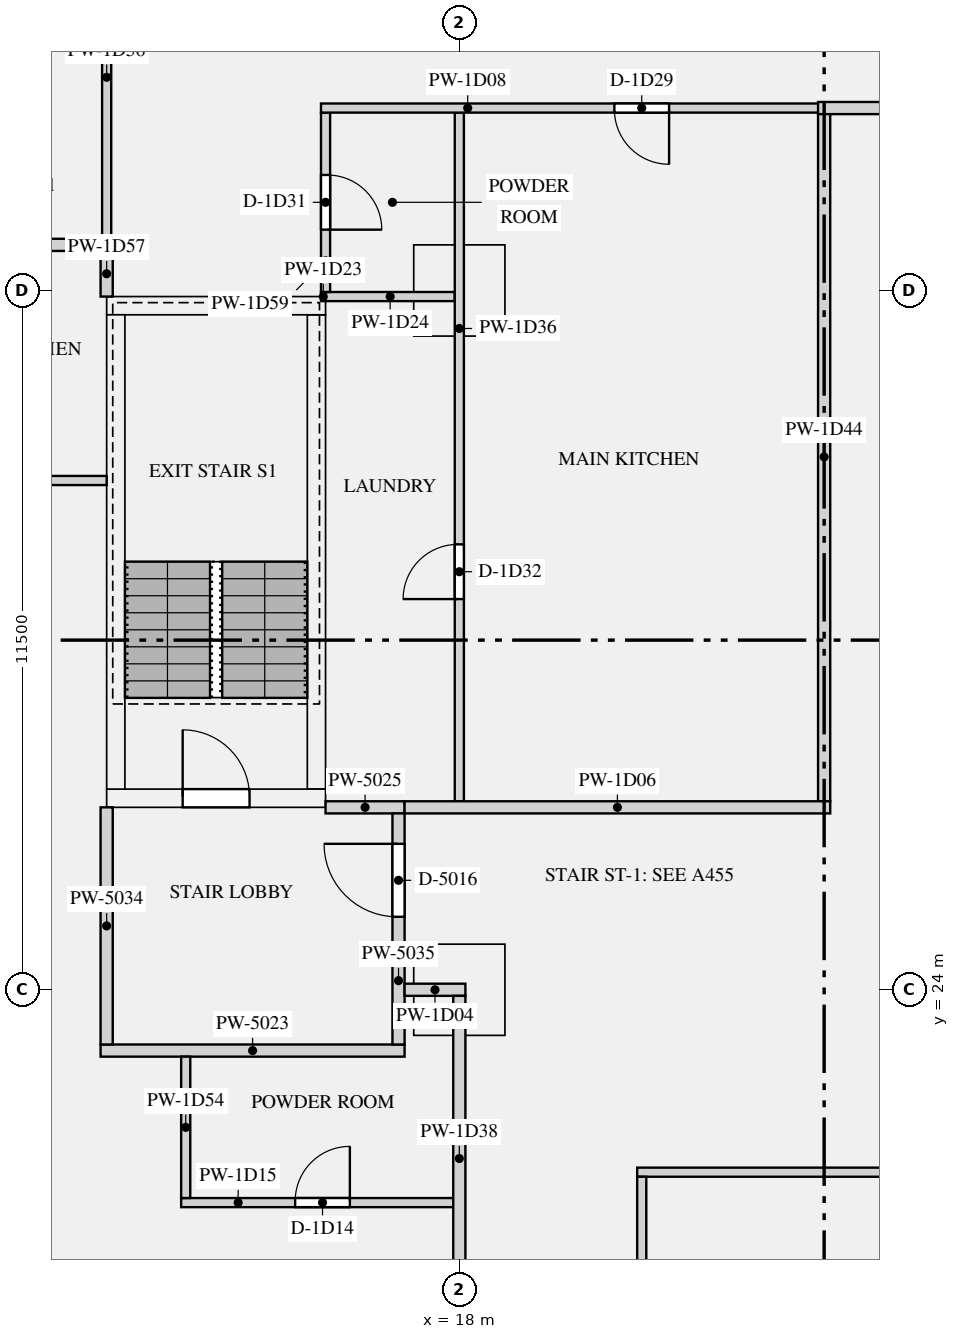
"""IFC4 building model, lengths in metres.
Left out: names, types, materials, properties, quantities, classifications, styles, units other than length and angle.
Written with IfcOpenShell. Run it as: python <this file> out.ifc"""

import sys

from ifc_helpers import new_model, si_unit, direction, frame, frame_2d, origin, origin_2d, place, context, subcontext, project, spatial, rectangle, extrude, element, fill, save


model = new_model("IFC4")
c1 = context("Model", 3, precision=1e-05, world=origin(), true_north=direction((0.0, 1.0)))
c2 = subcontext(c1, "Body", "Model", "MODEL_VIEW")
j1 = project(units=[si_unit("LENGTHUNIT", "METRE"), si_unit("PLANEANGLEUNIT", "RADIAN")], contexts=[c1])
p1 = place(None, origin())
s1 = spatial("IfcSite", under=j1, at=p1, CompositionType="ELEMENT")
p2 = place(p1, origin())
s2 = spatial("IfcBuilding", under=s1, at=p2, CompositionType="ELEMENT")
p3 = place(p2, frame((0.0, 0.0, 47.85)))
s3 = spatial("IfcBuildingStorey", under=s2, at=p3, CompositionType="ELEMENT", Elevation=47.85)
for number, where, z_axis, x_axis in (
    (1, (18.0, 24.0, 0.0), (0.0, 0.0, 1.0), (1.0, 0.0, 0.0)),
    (2, (18.0, 35.5, 0.0), (0.0, 0.0, 1.0), (1.0, 0.0, 0.0)),
):
    element("IfcColumn", number, at=place(p3, frame(where, z_axis=z_axis, x_axis=x_axis)), inside=s3, PredefinedType="COLUMN", context=c2, shape_type="SweptSolid", body=[
        extrude(rectangle(XDim=1.5, YDim=1.5, at=origin_2d()), origin(), (0.0, 0.0, 1.0), 3.15),
    ])
p4 = place(p3, frame((12.2, 27.15, 0.0), z_axis=(0.0, 0.0, 1.0), x_axis=(1.0, 0.0, 0.0)))
e3 = element("IfcWall", 3, at=p4, inside=s3, PredefinedType="SHEAR", context=c2, shape_type="SweptSolid", body=[
    extrude(rectangle(XDim=3.6, YDim=0.3, at=frame_2d((1.8, 0.0))), origin(), (0.0, 0.0, 1.0), 3.15),
])
p5 = place(p4, frame((1.25, 0.0, 0.0)))
e4 = element("IfcOpeningElement", 4, at=p5, cuts=e3, PredefinedType="OPENING", context=c2, shape_type="SweptSolid", body=[
    extrude(rectangle(XDim=1.1, YDim=2.1, at=frame_2d((0.55, 1.05))), frame((0.0, 0.16, 0.0), z_axis=(0.0, -1.0, 0.0), x_axis=(1.0, 0.0, 0.0)), (0.0, 0.0, 1.0), 0.32),
])
p6 = place(p3, frame((12.2, 35.25, 0.0), z_axis=(0.0, 0.0, 1.0), x_axis=(1.0, 0.0, 0.0)))
e5 = element("IfcWall", 5, at=p6, inside=s3, PredefinedType="SHEAR", context=c2, shape_type="SweptSolid", body=[
    extrude(rectangle(XDim=3.6, YDim=0.3, at=frame_2d((1.8, 0.0))), origin(), (0.0, 0.0, 1.0), 3.15),
])
for number, where, z_axis, x_axis in (
    (6, (12.35, 27.3, 0.0), (0.0, 0.0, 1.0), (0.0, 1.0, 0.0)),
    (7, (15.65, 27.3, 0.0), (0.0, 0.0, 1.0), (0.0, 1.0, 0.0)),
):
    element("IfcWall", number, at=place(p3, frame(where, z_axis=z_axis, x_axis=x_axis)), inside=s3, PredefinedType="SHEAR", context=c2, shape_type="SweptSolid", body=[
        extrude(rectangle(XDim=7.8, YDim=0.3, at=frame_2d((3.9, 0.0))), origin(), (0.0, 0.0, 1.0), 3.15),
    ])
p7 = place(p3, frame((12.1, 23.0, 0.0), z_axis=(0.0, 0.0, 1.0), x_axis=(1.0, 0.0, 0.0)))
e8 = element("IfcWall", 8, at=p7, inside=s3, PredefinedType="PARTITIONING", context=c2, shape_type="SweptSolid", body=[
    extrude(rectangle(XDim=5.0, YDim=0.2, at=frame_2d((2.5, 0.0))), origin(), (0.0, 0.0, 1.0), 2.83),
])
p8 = place(p3, frame((15.8, 27.0, 0.0), z_axis=(0.0, 0.0, 1.0), x_axis=(1.0, 0.0, 0.0)))
e9 = element("IfcWall", 9, at=p8, inside=s3, PredefinedType="PARTITIONING", context=c2, shape_type="SweptSolid", body=[
    extrude(rectangle(XDim=1.3, YDim=0.2, at=frame_2d((0.65, 0.0))), origin(), (0.0, 0.0, 1.0), 2.83),
])
p9 = place(p3, frame((12.2, 23.1, 0.0), z_axis=(0.0, 0.0, 1.0), x_axis=(0.0, 1.0, 0.0)))
e10 = element("IfcWall", 10, at=p9, inside=s3, PredefinedType="PARTITIONING", context=c2, shape_type="SweptSolid", body=[
    extrude(rectangle(XDim=3.9, YDim=0.2, at=frame_2d((1.95, 0.0))), origin(), (0.0, 0.0, 1.0), 2.83),
])
p10 = place(p3, frame((17.0, 23.1, 0.0), z_axis=(0.0, 0.0, 1.0), x_axis=(0.0, 1.0, 0.0)))
e11 = element("IfcWall", 11, at=p10, inside=s3, PredefinedType="PARTITIONING", context=c2, shape_type="SweptSolid", body=[
    extrude(rectangle(XDim=3.8, YDim=0.2, at=frame_2d((1.9, 0.0))), origin(), (0.0, 0.0, 1.0), 2.83),
])
p11 = place(p10, frame((2.1, 0.0, 0.0)))
e12 = element("IfcOpeningElement", 12, at=p11, cuts=e11, PredefinedType="OPENING", context=c2, shape_type="SweptSolid", body=[
    extrude(rectangle(XDim=1.2, YDim=2.1, at=frame_2d((0.6, 1.05))), frame((0.0, 0.11, 0.0), z_axis=(0.0, -1.0, 0.0), x_axis=(1.0, 0.0, 0.0)), (0.0, 0.0, 1.0), 0.22),
])
p12 = place(p3, frame((20.925, 21.0, 0.0), z_axis=(0.0, 0.0, 1.0), x_axis=(1.0, 0.0, 0.0)))
e13 = element("IfcWall", 13, at=p12, inside=s3, PredefinedType="PARTITIONING", context=c2, shape_type="SweptSolid", body=[
    extrude(rectangle(XDim=30.15, YDim=0.15, at=frame_2d((15.075, 0.0))), origin(), (0.0, 0.0, 1.0), 2.83),
])
p13 = place(p12, frame((4.125, 0.0, 0.0)))
e14 = element("IfcOpeningElement", 14, at=p13, cuts=e13, PredefinedType="OPENING", context=c2, shape_type="SweptSolid", body=[
    extrude(rectangle(XDim=0.9, YDim=2.1, at=frame_2d((0.45, 1.05))), frame((0.0, 0.085, 0.0), z_axis=(0.0, -1.0, 0.0), x_axis=(1.0, 0.0, 0.0)), (0.0, 0.0, 1.0), 0.17),
])
p14 = place(p12, frame((10.875, 0.0, 0.0)))
e15 = element("IfcOpeningElement", 15, at=p14, cuts=e13, PredefinedType="OPENING", context=c2, shape_type="SweptSolid", body=[
    extrude(rectangle(XDim=0.9, YDim=2.1, at=frame_2d((0.45, 1.05))), frame((0.0, 0.085, 0.0), z_axis=(0.0, -1.0, 0.0), x_axis=(1.0, 0.0, 0.0)), (0.0, 0.0, 1.0), 0.17),
])
p15 = place(p12, frame((16.125, 0.0, 0.0)))
e16 = element("IfcOpeningElement", 16, at=p15, cuts=e13, PredefinedType="OPENING", context=c2, shape_type="SweptSolid", body=[
    extrude(rectangle(XDim=0.9, YDim=2.1, at=frame_2d((0.45, 1.05))), frame((0.0, 0.085, 0.0), z_axis=(0.0, -1.0, 0.0), x_axis=(1.0, 0.0, 0.0)), (0.0, 0.0, 1.0), 0.17),
])
p16 = place(p12, frame((21.375, 0.0, 0.0)))
e17 = element("IfcOpeningElement", 17, at=p16, cuts=e13, PredefinedType="OPENING", context=c2, shape_type="SweptSolid", body=[
    extrude(rectangle(XDim=0.9, YDim=2.1, at=frame_2d((0.45, 1.05))), frame((0.0, 0.085, 0.0), z_axis=(0.0, -1.0, 0.0), x_axis=(1.0, 0.0, 0.0)), (0.0, 0.0, 1.0), 0.17),
])
p17 = place(p12, frame((26.625, 0.0, 0.0)))
e18 = element("IfcOpeningElement", 18, at=p17, cuts=e13, PredefinedType="OPENING", context=c2, shape_type="SweptSolid", body=[
    extrude(rectangle(XDim=0.9, YDim=2.1, at=frame_2d((0.45, 1.05))), frame((0.0, 0.085, 0.0), z_axis=(0.0, -1.0, 0.0), x_axis=(1.0, 0.0, 0.0)), (0.0, 0.0, 1.0), 0.17),
])
p18 = place(p3, frame((17.1, 24.0, 0.0), z_axis=(0.0, 0.0, 1.0), x_axis=(1.0, 0.0, 0.0)))
e19 = element("IfcWall", 19, at=p18, inside=s3, PredefinedType="PARTITIONING", context=c2, shape_type="SweptSolid", body=[
    extrude(rectangle(XDim=1.0, YDim=0.2, at=frame_2d((0.5, 0.0))), origin(), (0.0, 0.0, 1.0), 2.83),
])
p19 = place(p3, frame((17.1, 27.0, 0.0), z_axis=(0.0, 0.0, 1.0), x_axis=(1.0, 0.0, 0.0)))
e20 = element("IfcWall", 20, at=p19, inside=s3, PredefinedType="PARTITIONING", context=c2, shape_type="SweptSolid", body=[
    extrude(rectangle(XDim=7.0, YDim=0.2, at=frame_2d((3.5, 0.0))), origin(), (0.0, 0.0, 1.0), 2.83),
])
p20 = place(p3, frame((15.725, 38.5, 0.0), z_axis=(0.0, 0.0, 1.0), x_axis=(1.0, 0.0, 0.0)))
e21 = element("IfcWall", 21, at=p20, inside=s3, PredefinedType="PARTITIONING", context=c2, shape_type="SweptSolid", body=[
    extrude(rectangle(XDim=8.375, YDim=0.15, at=frame_2d((4.188, 0.0))), origin(), (0.0, 0.0, 1.0), 2.83),
])
p21 = place(p20, frame((4.825, 0.0, 0.0)))
e22 = element("IfcOpeningElement", 22, at=p21, cuts=e21, PredefinedType="OPENING", context=c2, shape_type="SweptSolid", body=[
    extrude(rectangle(XDim=0.9, YDim=2.1, at=frame_2d((0.45, 1.05))), frame((0.0, 0.085, 0.0), z_axis=(0.0, -1.0, 0.0), x_axis=(1.0, 0.0, 0.0)), (0.0, 0.0, 1.0), 0.17),
])
p22 = place(p3, frame((23.9, 38.5, 0.0), z_axis=(0.0, 0.0, 1.0), x_axis=(1.0, 0.0, 0.0)))
e23 = element("IfcWall", 23, at=p22, inside=s3, PredefinedType="PARTITIONING", context=c2, shape_type="SweptSolid", body=[
    extrude(rectangle(XDim=24.2, YDim=0.2, at=frame_2d((12.1, 0.0))), origin(), (0.0, 0.0, 1.0), 2.83),
])
p23 = place(p22, frame((3.55, 0.0, 0.0)))
e24 = element("IfcOpeningElement", 24, at=p23, cuts=e23, PredefinedType="OPENING", context=c2, shape_type="SweptSolid", body=[
    extrude(rectangle(XDim=1.1, YDim=2.1, at=frame_2d((0.55, 1.05))), frame((0.0, 0.11, 0.0), z_axis=(0.0, -1.0, 0.0), x_axis=(1.0, 0.0, 0.0)), (0.0, 0.0, 1.0), 0.22),
])
p24 = place(p22, frame((21.4, 0.0, 0.0)))
e25 = element("IfcOpeningElement", 25, at=p24, cuts=e23, PredefinedType="OPENING", context=c2, shape_type="SweptSolid", body=[
    extrude(rectangle(XDim=1.1, YDim=2.1, at=frame_2d((0.55, 1.05))), frame((0.0, 0.11, 0.0), z_axis=(0.0, -1.0, 0.0), x_axis=(1.0, 0.0, 0.0)), (0.0, 0.0, 1.0), 0.22),
])
p25 = place(p3, frame((13.425, 20.5, 0.0), z_axis=(0.0, 0.0, 1.0), x_axis=(1.0, 0.0, 0.0)))
e26 = element("IfcWall", 26, at=p25, inside=s3, PredefinedType="PARTITIONING", context=c2, shape_type="SweptSolid", body=[
    extrude(rectangle(XDim=4.475, YDim=0.15, at=frame_2d((2.237, 0.0))), origin(), (0.0, 0.0, 1.0), 2.83),
])
p26 = place(p25, frame((1.875, 0.0, 0.0)))
e27 = element("IfcOpeningElement", 27, at=p26, cuts=e26, PredefinedType="OPENING", context=c2, shape_type="SweptSolid", body=[
    extrude(rectangle(XDim=0.9, YDim=2.1, at=frame_2d((0.45, 1.05))), frame((0.0, 0.085, 0.0), z_axis=(0.0, -1.0, 0.0), x_axis=(1.0, 0.0, 0.0)), (0.0, 0.0, 1.0), 0.17),
])
p27 = place(p3, frame((0.8, 32.375, 0.0), z_axis=(0.0, 0.0, 1.0), x_axis=(1.0, 0.0, 0.0)))
e28 = element("IfcWall", 28, at=p27, inside=s3, PredefinedType="PARTITIONING", context=c2, shape_type="SweptSolid", body=[
    extrude(rectangle(XDim=11.4, YDim=0.15, at=frame_2d((5.7, 0.0))), origin(), (0.0, 0.0, 1.0), 2.83),
])
p28 = place(p27, frame((3.275, 0.0, 0.0)))
e29 = element("IfcOpeningElement", 29, at=p28, cuts=e28, PredefinedType="OPENING", context=c2, shape_type="SweptSolid", body=[
    extrude(rectangle(XDim=1.5, YDim=2.1, at=frame_2d((0.75, 1.05))), frame((0.0, 0.085, 0.0), z_axis=(0.0, -1.0, 0.0), x_axis=(1.0, 0.0, 0.0)), (0.0, 0.0, 1.0), 0.17),
])
p29 = place(p27, frame((9.35, 0.0, 0.0)))
e30 = element("IfcOpeningElement", 30, at=p29, cuts=e28, PredefinedType="OPENING", context=c2, shape_type="SweptSolid", body=[
    extrude(rectangle(XDim=0.9, YDim=2.1, at=frame_2d((0.45, 1.05))), frame((0.0, 0.085, 0.0), z_axis=(0.0, -1.0, 0.0), x_axis=(1.0, 0.0, 0.0)), (0.0, 0.0, 1.0), 0.17),
])
p30 = place(p3, frame((0.8, 36.25, 0.0), z_axis=(0.0, 0.0, 1.0), x_axis=(1.0, 0.0, 0.0)))
e31 = element("IfcWall", 31, at=p30, inside=s3, PredefinedType="PARTITIONING", context=c2, shape_type="SweptSolid", body=[
    extrude(rectangle(XDim=11.475, YDim=0.2, at=frame_2d((5.737, 0.0))), origin(), (0.0, 0.0, 1.0), 2.83),
])
p31 = place(p3, frame((15.725, 35.4, 0.0), z_axis=(0.0, 0.0, 1.0), x_axis=(1.0, 0.0, 0.0)))
e32 = element("IfcWall", 32, at=p31, inside=s3, PredefinedType="PARTITIONING", context=c2, shape_type="SweptSolid", body=[
    extrude(rectangle(XDim=0.075, YDim=0.15, at=frame_2d((0.038, 0.0))), origin(), (0.0, 0.0, 1.0), 2.83),
])
p32 = place(p3, frame((15.8, 35.4, 0.0), z_axis=(0.0, 0.0, 1.0), x_axis=(1.0, 0.0, 0.0)))
e33 = element("IfcWall", 33, at=p32, inside=s3, PredefinedType="PARTITIONING", context=c2, shape_type="SweptSolid", body=[
    extrude(rectangle(XDim=2.125, YDim=0.15, at=frame_2d((1.062, 0.0))), origin(), (0.0, 0.0, 1.0), 2.83),
])
p33 = place(p3, frame((18.0, 27.1, 0.0), z_axis=(0.0, 0.0, 1.0), x_axis=(0.0, 1.0, 0.0)))
e34 = element("IfcWall", 34, at=p33, inside=s3, PredefinedType="PARTITIONING", context=c2, shape_type="SweptSolid", body=[
    extrude(rectangle(XDim=11.325, YDim=0.15, at=frame_2d((5.663, 0.0))), origin(), (0.0, 0.0, 1.0), 2.83),
])
p34 = place(p33, frame((3.325, 0.0, 0.0)))
e35 = element("IfcOpeningElement", 35, at=p34, cuts=e34, PredefinedType="OPENING", context=c2, shape_type="SweptSolid", body=[
    extrude(rectangle(XDim=0.9, YDim=2.1, at=frame_2d((0.45, 1.05))), frame((0.0, 0.085, 0.0), z_axis=(0.0, -1.0, 0.0), x_axis=(1.0, 0.0, 0.0)), (0.0, 0.0, 1.0), 0.17),
])
p35 = place(p3, frame((18.0, 16.1, 0.0), z_axis=(0.0, 0.0, 1.0), x_axis=(0.0, 1.0, 0.0)))
e36 = element("IfcWall", 36, at=p35, inside=s3, PredefinedType="PARTITIONING", context=c2, shape_type="SweptSolid", body=[
    extrude(rectangle(XDim=7.8, YDim=0.2, at=frame_2d((3.9, 0.0))), origin(), (0.0, 0.0, 1.0), 2.83),
])
p36 = place(p35, frame((1.35, 0.0, 0.0)))
e37 = element("IfcOpeningElement", 37, at=p36, cuts=e36, PredefinedType="OPENING", context=c2, shape_type="SweptSolid", body=[
    extrude(rectangle(XDim=1.1, YDim=2.1, at=frame_2d((0.55, 1.05))), frame((0.0, 0.11, 0.0), z_axis=(0.0, -1.0, 0.0), x_axis=(1.0, 0.0, 0.0)), (0.0, 0.0, 1.0), 0.22),
])
p37 = place(p3, frame((21.0, 16.1, 0.0), z_axis=(0.0, 0.0, 1.0), x_axis=(0.0, 1.0, 0.0)))
e38 = element("IfcWall", 38, at=p37, inside=s3, PredefinedType="PARTITIONING", context=c2, shape_type="SweptSolid", body=[
    extrude(rectangle(XDim=4.825, YDim=0.15, at=frame_2d((2.413, 0.0))), origin(), (0.0, 0.0, 1.0), 2.83),
])
p38 = place(p3, frame((24.0, 27.1, 0.0), z_axis=(0.0, 0.0, 1.0), x_axis=(0.0, 1.0, 0.0)))
e39 = element("IfcWall", 39, at=p38, inside=s3, PredefinedType="PARTITIONING", context=c2, shape_type="SweptSolid", body=[
    extrude(rectangle(XDim=11.325, YDim=0.2, at=frame_2d((5.663, 0.0))), origin(), (0.0, 0.0, 1.0), 2.83),
])
p39 = place(p3, frame((13.5, 20.575, 0.0), z_axis=(0.0, 0.0, 1.0), x_axis=(0.0, 1.0, 0.0)))
e40 = element("IfcWall", 40, at=p39, inside=s3, PredefinedType="PARTITIONING", context=c2, shape_type="SweptSolid", body=[
    extrude(rectangle(XDim=2.325, YDim=0.15, at=frame_2d((1.163, 0.0))), origin(), (0.0, 0.0, 1.0), 2.83),
])
p40 = place(p3, frame((12.2, 36.35, 0.0), z_axis=(0.0, 0.0, 1.0), x_axis=(0.0, 1.0, 0.0)))
e41 = element("IfcWall", 41, at=p40, inside=s3, PredefinedType="PARTITIONING", context=c2, shape_type="SweptSolid", body=[
    extrude(rectangle(XDim=7.575, YDim=0.15, at=frame_2d((3.788, 0.0))), origin(), (0.0, 0.0, 1.0), 2.83),
])
p41 = place(p40, frame((5.312, 0.0, 0.0)))
e42 = element("IfcOpeningElement", 42, at=p41, cuts=e41, PredefinedType="OPENING", context=c2, shape_type="SweptSolid", body=[
    extrude(rectangle(XDim=0.8, YDim=2.1, at=frame_2d((0.4, 1.05))), frame((0.0, 0.085, 0.0), z_axis=(0.0, -1.0, 0.0), x_axis=(1.0, 0.0, 0.0)), (0.0, 0.0, 1.0), 0.17),
])
p42 = place(p3, frame((12.2, 35.4, 0.0), z_axis=(0.0, 0.0, 1.0), x_axis=(0.0, 1.0, 0.0)))
e43 = element("IfcWall", 43, at=p42, inside=s3, PredefinedType="PARTITIONING", context=c2, shape_type="SweptSolid", body=[
    extrude(rectangle(XDim=0.75, YDim=0.2, at=frame_2d((0.375, 0.0))), origin(), (0.0, 0.0, 1.0), 2.83),
])
p43 = place(p3, frame((15.8, 35.475, 0.0), z_axis=(0.0, 0.0, 1.0), x_axis=(0.0, 1.0, 0.0)))
e44 = element("IfcWall", 44, at=p43, inside=s3, PredefinedType="PARTITIONING", context=c2, shape_type="SweptSolid", body=[
    extrude(rectangle(XDim=2.95, YDim=0.15, at=frame_2d((1.475, 0.0))), origin(), (0.0, 0.0, 1.0), 2.83),
])
p44 = place(p43, frame((1.025, 0.0, 0.0)))
e45 = element("IfcOpeningElement", 45, at=p44, cuts=e44, PredefinedType="OPENING", context=c2, shape_type="SweptSolid", body=[
    extrude(rectangle(XDim=0.9, YDim=2.1, at=frame_2d((0.45, 1.05))), frame((0.0, 0.085, 0.0), z_axis=(0.0, -1.0, 0.0), x_axis=(1.0, 0.0, 0.0)), (0.0, 0.0, 1.0), 0.17),
])
p45 = place(p5, origin())
e46 = element("IfcDoor", 46, at=p45, inside=s3, OperationType="SINGLE_SWING_LEFT", PredefinedType="DOOR", context=c2, shape_type="SweptSolid", body=[
    extrude(rectangle(XDim=1.1, YDim=2.1, at=frame_2d((0.55, 1.05))), frame((0.0, 0.025, 0.0), z_axis=(0.0, -1.0, 0.0), x_axis=(1.0, 0.0, 0.0)), (0.0, 0.0, 1.0), 0.05),
])
fill(e4, e46)
p46 = place(p11, origin())
e47 = element("IfcDoor", 47, at=p46, inside=s3, OperationType="SINGLE_SWING_RIGHT", PredefinedType="DOOR", context=c2, shape_type="SweptSolid", body=[
    extrude(rectangle(XDim=1.2, YDim=2.1, at=frame_2d((0.6, 1.05))), frame((0.0, 0.025, 0.0), z_axis=(0.0, -1.0, 0.0), x_axis=(1.0, 0.0, 0.0)), (0.0, 0.0, 1.0), 0.05),
])
fill(e12, e47)
p47 = place(p26, origin())
e48 = element("IfcDoor", 48, at=p47, inside=s3, OperationType="SINGLE_SWING_RIGHT", PredefinedType="DOOR", context=c2, shape_type="SweptSolid", body=[
    extrude(rectangle(XDim=0.9, YDim=2.1, at=frame_2d((0.45, 1.05))), frame((0.0, 0.025, 0.0), z_axis=(0.0, -1.0, 0.0), x_axis=(1.0, 0.0, 0.0)), (0.0, 0.0, 1.0), 0.05),
])
fill(e27, e48)
p48 = place(p21, frame((0.9, 0.0, 0.0), z_axis=(0.0, 0.0, 1.0), x_axis=(-1.0, 0.0, 0.0)))
e49 = element("IfcDoor", 49, at=p48, inside=s3, OperationType="SINGLE_SWING_LEFT", PredefinedType="DOOR", context=c2, shape_type="SweptSolid", body=[
    extrude(rectangle(XDim=0.9, YDim=2.1, at=frame_2d((0.45, 1.05))), frame((0.0, 0.025, 0.0), z_axis=(0.0, -1.0, 0.0), x_axis=(1.0, 0.0, 0.0)), (0.0, 0.0, 1.0), 0.05),
])
fill(e22, e49)
p49 = place(p44, frame((0.9, 0.0, 0.0), z_axis=(0.0, 0.0, 1.0), x_axis=(-1.0, 0.0, 0.0)))
e50 = element("IfcDoor", 50, at=p49, inside=s3, OperationType="SINGLE_SWING_RIGHT", PredefinedType="DOOR", context=c2, shape_type="SweptSolid", body=[
    extrude(rectangle(XDim=0.9, YDim=2.1, at=frame_2d((0.45, 1.05))), frame((0.0, 0.025, 0.0), z_axis=(0.0, -1.0, 0.0), x_axis=(1.0, 0.0, 0.0)), (0.0, 0.0, 1.0), 0.05),
])
fill(e45, e50)
p50 = place(p34, origin())
e51 = element("IfcDoor", 51, at=p50, inside=s3, OperationType="SINGLE_SWING_LEFT", PredefinedType="DOOR", context=c2, shape_type="SweptSolid", body=[
    extrude(rectangle(XDim=0.9, YDim=2.1, at=frame_2d((0.45, 1.05))), frame((0.0, 0.025, 0.0), z_axis=(0.0, -1.0, 0.0), x_axis=(1.0, 0.0, 0.0)), (0.0, 0.0, 1.0), 0.05),
])
fill(e35, e51)
save(model, sys.argv[1])
